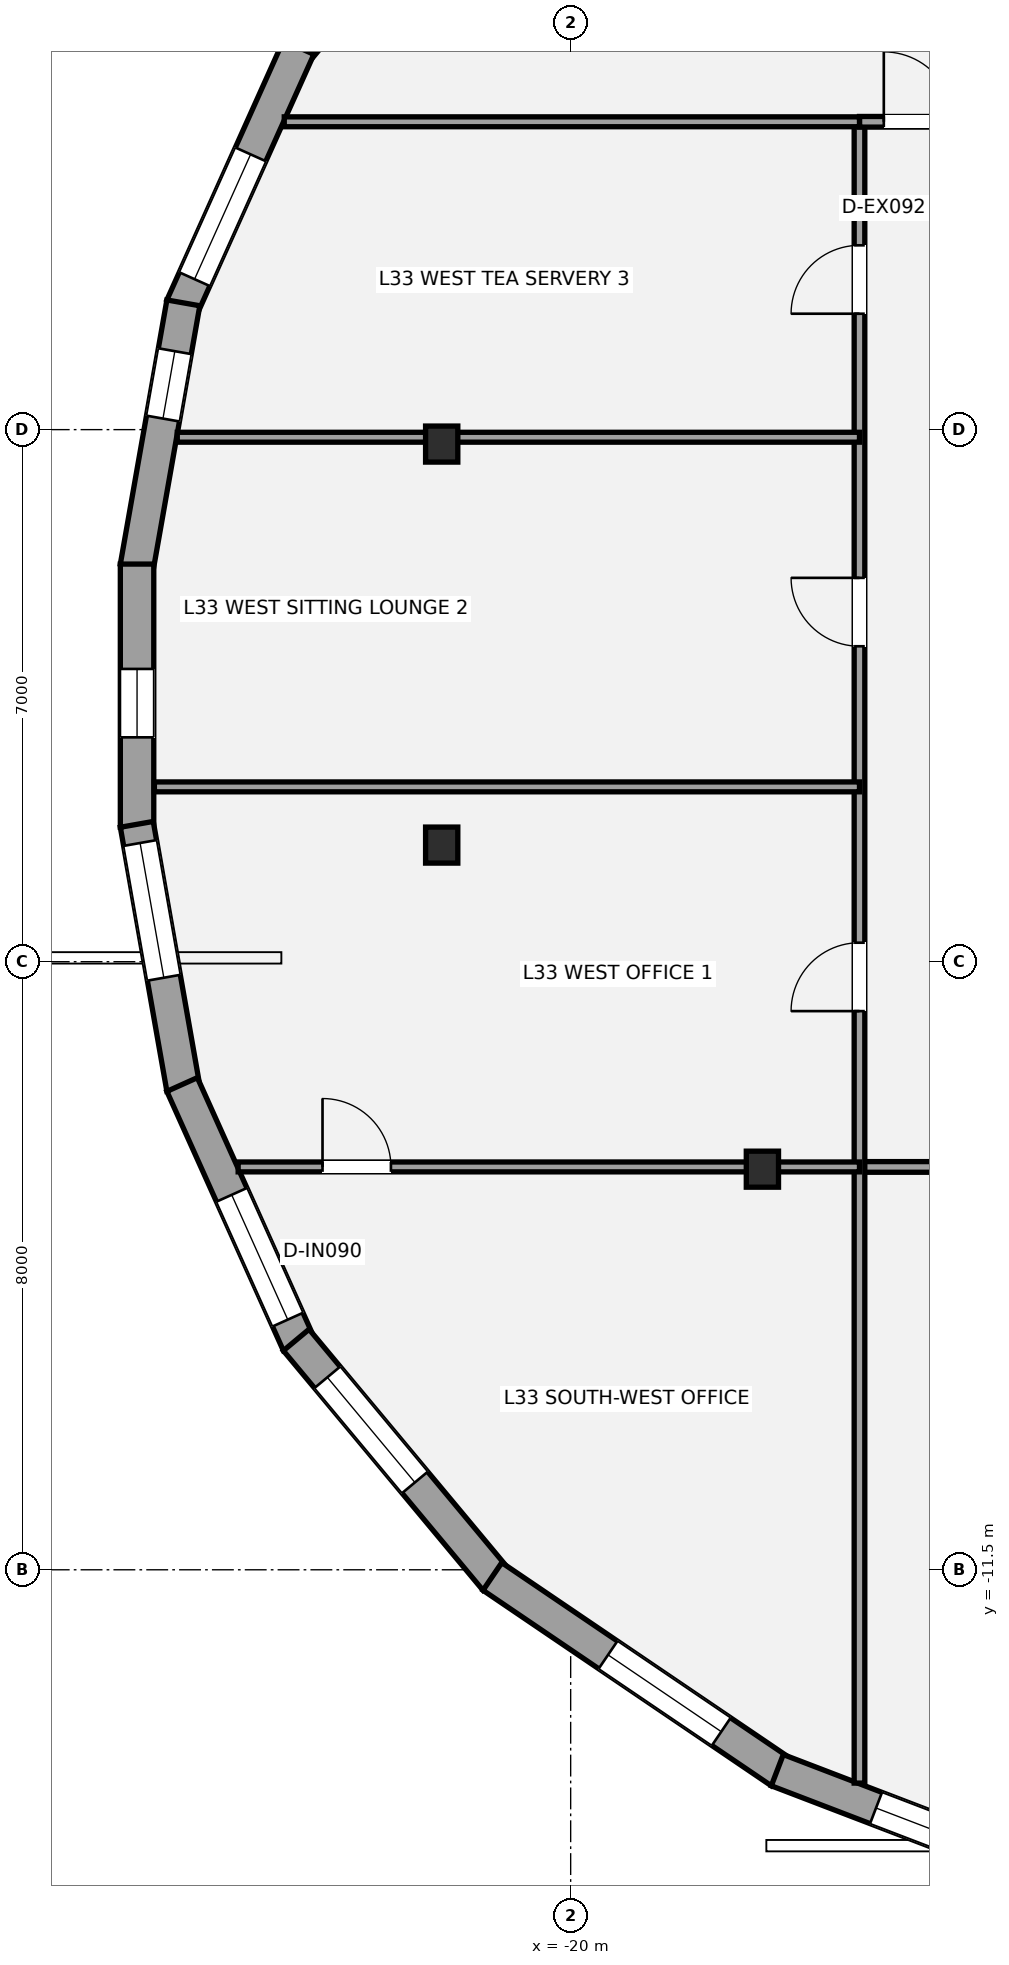
"""IFC4 building model, lengths in metres.
Left out: names, types, materials, properties, quantities, classifications, styles, units other than length and angle.
Written with IfcOpenShell. Run it as: python <this file> out.ifc"""

import sys

from ifc_helpers import new_model, si_unit, direction, frame, frame_2d, origin, origin_2d, place, context, subcontext, project, spatial, rectangle, i_section, extrude, element, fill, save


model = new_model("IFC4")
c1 = context("Model", 3, precision=1e-05, world=origin(), true_north=direction((0.0, 1.0)))
c2 = subcontext(c1, "Body", "Model", "MODEL_VIEW")
j1 = project(units=[si_unit("LENGTHUNIT", "METRE"), si_unit("PLANEANGLEUNIT", "RADIAN")], contexts=[c1])
p1 = place(None, origin())
s1 = spatial("IfcSite", under=j1, at=p1, CompositionType="ELEMENT")
p2 = place(p1, origin())
s2 = spatial("IfcBuilding", under=s1, at=p2, CompositionType="ELEMENT")
p3 = place(p2, frame((0.0, 0.0, 124.6)))
s3 = spatial("IfcBuildingStorey", under=s2, at=p3, CompositionType="ELEMENT", Elevation=124.6)
for number, where, z_axis, x_axis in (
    (1, (-21.697, 3.31, 0.0), (0.0, 0.0, 1.0), (1.0, 0.0, 0.0)),
    (2, (-21.697, -1.966, 0.0), (0.0, 0.0, 1.0), (1.0, 0.0, 0.0)),
    (3, (-17.477, -6.229, 0.0), (0.0, 0.0, 1.0), (1.0, 0.0, 0.0)),
):
    element("IfcColumn", number, at=place(p3, frame(where, z_axis=z_axis, x_axis=x_axis)), inside=s3, PredefinedType="COLUMN", context=c2, shape_type="SweptSolid", body=[
        extrude(i_section(OverallWidth=0.424, OverallDepth=0.474, WebThickness=0.048, FlangeThickness=0.077, at=origin_2d()), origin(), (0.0, 0.0, 1.0), 3.5),
    ])
p4 = place(p3, frame((-23.611, 8.477, 0.0), z_axis=(0.0, 0.0, 1.0), x_axis=(0.640084904994, 0.768304180906, 0.0)))
e4 = element("IfcWall", 4, at=p4, inside=s3, PredefinedType="STANDARD", context=c2, shape_type="SweptSolid", body=[
    extrude(rectangle(XDim=4.103, YDim=0.44, at=frame_2d((2.052, 0.0))), origin(), (0.0, 0.0, 1.0), 2.528),
])
p5 = place(p4, frame((1.664, 0.0, 0.65)))
e5 = element("IfcOpeningElement", 5, at=p5, cuts=e4, PredefinedType="OPENING", context=c2, shape_type="SweptSolid", body=[
    extrude(rectangle(XDim=1.8, YDim=1.7, at=frame_2d((0.9, 0.85))), frame((0.0, 0.23, 0.0), z_axis=(0.0, -1.0, 0.0), x_axis=(1.0, 0.0, 0.0)), (0.0, 0.0, 1.0), 0.46),
])
p6 = place(p3, frame((-25.112, 5.116, 0.0), z_axis=(0.0, 0.0, 1.0), x_axis=(0.409835385481, 0.912159501846, 0.0)))
e6 = element("IfcWall", 6, at=p6, inside=s3, PredefinedType="STANDARD", context=c2, shape_type="SweptSolid", body=[
    extrude(rectangle(XDim=3.74, YDim=0.44, at=frame_2d((1.87, 0.0))), origin(), (0.0, 0.0, 1.0), 2.528),
])
p7 = place(p6, frame((0.399, 0.0, 0.65)))
e7 = element("IfcOpeningElement", 7, at=p7, cuts=e6, PredefinedType="OPENING", context=c2, shape_type="SweptSolid", body=[
    extrude(rectangle(XDim=1.8, YDim=1.7, at=frame_2d((0.9, 0.85))), frame((0.0, 0.23, 0.0), z_axis=(0.0, -1.0, 0.0), x_axis=(1.0, 0.0, 0.0)), (0.0, 0.0, 1.0), 0.46),
])
p8 = place(p3, frame((-25.708, 1.693, 0.0), z_axis=(0.0, 0.0, 1.0), x_axis=(0.173615589384, 0.98481349865, 0.0)))
e8 = element("IfcWall", 8, at=p8, inside=s3, PredefinedType="STANDARD", context=c2, shape_type="SweptSolid", body=[
    extrude(rectangle(XDim=3.528, YDim=0.44, at=frame_2d((1.764, 0.0))), origin(), (0.0, 0.0, 1.0), 2.528),
])
p9 = place(p8, frame((1.983, 0.0, 0.58)))
e9 = element("IfcOpeningElement", 9, at=p9, cuts=e8, PredefinedType="OPENING", context=c2, shape_type="SweptSolid", body=[
    extrude(rectangle(XDim=0.9, YDim=1.35, at=frame_2d((0.45, 0.675))), frame((0.0, 0.23, 0.0), z_axis=(0.0, -1.0, 0.0), x_axis=(1.0, 0.0, 0.0)), (0.0, 0.0, 1.0), 0.46),
])
p10 = place(p3, frame((-25.705, -1.731, 0.0), z_axis=(0.0, 0.0, 1.0), x_axis=(0.0, 1.0, 0.0)))
e10 = element("IfcWall", 10, at=p10, inside=s3, PredefinedType="STANDARD", context=c2, shape_type="SweptSolid", body=[
    extrude(rectangle(XDim=3.462, YDim=0.44, at=frame_2d((1.731, 0.0))), origin(), (0.0, 0.0, 1.0), 2.528),
])
p11 = place(p10, frame((1.183, 0.0, 0.58)))
e11 = element("IfcOpeningElement", 11, at=p11, cuts=e10, PredefinedType="OPENING", context=c2, shape_type="SweptSolid", body=[
    extrude(rectangle(XDim=0.9, YDim=1.35, at=frame_2d((0.45, 0.675))), frame((0.0, 0.23, 0.0), z_axis=(0.0, -1.0, 0.0), x_axis=(1.0, 0.0, 0.0)), (0.0, 0.0, 1.0), 0.46),
])
p12 = place(p3, frame((-25.096, -5.168, 0.0), z_axis=(0.0, 0.0, 1.0), x_axis=(-0.173615589384, 0.98481349865, 0.0)))
e12 = element("IfcWall", 12, at=p12, inside=s3, PredefinedType="STANDARD", context=c2, shape_type="SweptSolid", body=[
    extrude(rectangle(XDim=3.528, YDim=0.44, at=frame_2d((1.764, 0.0))), origin(), (0.0, 0.0, 1.0), 2.528),
])
p13 = place(p12, frame((1.479, 0.0, 0.65)))
e13 = element("IfcOpeningElement", 13, at=p13, cuts=e12, PredefinedType="OPENING", context=c2, shape_type="SweptSolid", body=[
    extrude(rectangle(XDim=1.8, YDim=1.7, at=frame_2d((0.9, 0.85))), frame((0.0, 0.23, 0.0), z_axis=(0.0, -1.0, 0.0), x_axis=(1.0, 0.0, 0.0)), (0.0, 0.0, 1.0), 0.46),
])
p14 = place(p3, frame((-23.579, -8.528, 0.0), z_axis=(0.0, 0.0, 1.0), x_axis=(-0.409835385481, 0.912159501846, 0.0)))
e14 = element("IfcWall", 14, at=p14, inside=s3, PredefinedType="STANDARD", context=c2, shape_type="SweptSolid", body=[
    extrude(rectangle(XDim=3.74, YDim=0.44, at=frame_2d((1.87, 0.0))), origin(), (0.0, 0.0, 1.0), 2.528),
])
p15 = place(p14, frame((0.349, 0.0, 0.65)))
e15 = element("IfcOpeningElement", 15, at=p15, cuts=e14, PredefinedType="OPENING", context=c2, shape_type="SweptSolid", body=[
    extrude(rectangle(XDim=1.8, YDim=1.7, at=frame_2d((0.9, 0.85))), frame((0.0, 0.23, 0.0), z_axis=(0.0, -1.0, 0.0), x_axis=(1.0, 0.0, 0.0)), (0.0, 0.0, 1.0), 0.46),
])
p16 = place(p3, frame((-20.984, -11.629, 0.0), z_axis=(0.0, 0.0, 1.0), x_axis=(-0.640084904994, 0.768304180906, 0.0)))
e16 = element("IfcWall", 16, at=p16, inside=s3, PredefinedType="STANDARD", context=c2, shape_type="SweptSolid", body=[
    extrude(rectangle(XDim=4.103, YDim=0.44, at=frame_2d((2.052, 0.0))), origin(), (0.0, 0.0, 1.0), 2.528),
])
p17 = place(p16, frame((1.664, 0.0, 0.65)))
e17 = element("IfcOpeningElement", 17, at=p17, cuts=e16, PredefinedType="OPENING", context=c2, shape_type="SweptSolid", body=[
    extrude(rectangle(XDim=1.8, YDim=1.7, at=frame_2d((0.9, 0.85))), frame((0.0, 0.23, 0.0), z_axis=(0.0, -1.0, 0.0), x_axis=(1.0, 0.0, 0.0)), (0.0, 0.0, 1.0), 0.46),
])
p18 = place(p3, frame((-17.237, -14.16, 0.0), z_axis=(0.0, 0.0, 1.0), x_axis=(-0.827672849676, 0.561210881852, 0.0)))
e18 = element("IfcWall", 18, at=p18, inside=s3, PredefinedType="STANDARD", context=c2, shape_type="SweptSolid", body=[
    extrude(rectangle(XDim=4.583, YDim=0.44, at=frame_2d((2.292, 0.0))), origin(), (0.0, 0.0, 1.0), 2.528),
])
p19 = place(p18, frame((0.945, 0.0, 0.65)))
e19 = element("IfcOpeningElement", 19, at=p19, cuts=e18, PredefinedType="OPENING", context=c2, shape_type="SweptSolid", body=[
    extrude(rectangle(XDim=1.8, YDim=1.7, at=frame_2d((0.9, 0.85))), frame((0.0, 0.23, 0.0), z_axis=(0.0, -1.0, 0.0), x_axis=(1.0, 0.0, 0.0)), (0.0, 0.0, 1.0), 0.46),
])
p20 = place(p3, frame((-12.632, -15.917, 0.0), z_axis=(0.0, 0.0, 1.0), x_axis=(-0.933853964101, 0.357654545243, 0.0)))
e20 = element("IfcWall", 20, at=p20, inside=s3, PredefinedType="STANDARD", context=c2, shape_type="SweptSolid", body=[
    extrude(rectangle(XDim=4.979, YDim=0.44, at=frame_2d((2.49, 0.0))), origin(), (0.0, 0.0, 1.0), 2.528),
])
p21 = place(p20, frame((1.788, 0.0, 0.48)))
e21 = element("IfcOpeningElement", 21, at=p21, cuts=e20, PredefinedType="OPENING", context=c2, shape_type="SweptSolid", body=[
    extrude(rectangle(XDim=1.8, YDim=1.7, at=frame_2d((0.9, 0.85))), frame((0.0, 0.23, 0.0), z_axis=(0.0, -1.0, 0.0), x_axis=(1.0, 0.0, 0.0)), (0.0, 0.0, 1.0), 0.46),
])
p22 = place(p3, frame((-16.2, -6.2, 0.0), z_axis=(0.0, 0.0, 1.0), x_axis=(1.0, 0.0, 0.0)))
e22 = element("IfcWall", 22, at=p22, inside=s3, PredefinedType="PARTITIONING", context=c2, shape_type="SweptSolid", body=[
    extrude(rectangle(XDim=34.0, YDim=0.14, at=frame_2d((17.0, 0.0))), origin(), (0.0, 0.0, 1.0), 2.688),
])
p23 = place(p22, frame((2.75, 0.0, 0.0)))
e23 = element("IfcOpeningElement", 23, at=p23, cuts=e22, PredefinedType="OPENING", context=c2, shape_type="SweptSolid", body=[
    extrude(rectangle(XDim=0.9, YDim=2.1, at=frame_2d((0.45, 1.05))), frame((0.0, 0.08, 0.0), z_axis=(0.0, -1.0, 0.0), x_axis=(1.0, 0.0, 0.0)), (0.0, 0.0, 1.0), 0.16),
])
p24 = place(p22, frame((9.45, 0.0, 0.0)))
e24 = element("IfcOpeningElement", 24, at=p24, cuts=e22, PredefinedType="OPENING", context=c2, shape_type="SweptSolid", body=[
    extrude(rectangle(XDim=0.9, YDim=2.1, at=frame_2d((0.45, 1.05))), frame((0.0, 0.08, 0.0), z_axis=(0.0, -1.0, 0.0), x_axis=(1.0, 0.0, 0.0)), (0.0, 0.0, 1.0), 0.16),
])
p25 = place(p22, frame((16.45, 0.0, 0.0)))
e25 = element("IfcOpeningElement", 25, at=p25, cuts=e22, PredefinedType="OPENING", context=c2, shape_type="SweptSolid", body=[
    extrude(rectangle(XDim=0.9, YDim=2.1, at=frame_2d((0.45, 1.05))), frame((0.0, 0.08, 0.0), z_axis=(0.0, -1.0, 0.0), x_axis=(1.0, 0.0, 0.0)), (0.0, 0.0, 1.0), 0.16),
])
p26 = place(p22, frame((22.95, 0.0, 0.0)))
e26 = element("IfcOpeningElement", 26, at=p26, cuts=e22, PredefinedType="OPENING", context=c2, shape_type="SweptSolid", body=[
    extrude(rectangle(XDim=0.9, YDim=2.1, at=frame_2d((0.45, 1.05))), frame((0.0, 0.08, 0.0), z_axis=(0.0, -1.0, 0.0), x_axis=(1.0, 0.0, 0.0)), (0.0, 0.0, 1.0), 0.16),
])
p27 = place(p22, frame((29.45, 0.0, 0.0)))
e27 = element("IfcOpeningElement", 27, at=p27, cuts=e22, PredefinedType="OPENING", context=c2, shape_type="SweptSolid", body=[
    extrude(rectangle(XDim=1.5, YDim=2.15, at=frame_2d((0.75, 1.075))), frame((0.0, 0.08, 0.0), z_axis=(0.0, -1.0, 0.0), x_axis=(1.0, 0.0, 0.0)), (0.0, 0.0, 1.0), 0.16),
])
p28 = place(p3, frame((-16.2, -14.306, 0.0), z_axis=(0.0, 0.0, 1.0), x_axis=(0.0, 1.0, 0.0)))
e28 = element("IfcWall", 28, at=p28, inside=s3, PredefinedType="PARTITIONING", context=c2, shape_type="SweptSolid", body=[
    extrude(rectangle(XDim=21.856, YDim=0.14, at=frame_2d((10.928, 0.0))), origin(), (0.0, 0.0, 1.0), 2.763),
])
p29 = place(p28, frame((10.156, 0.0, 0.0)))
e29 = element("IfcOpeningElement", 29, at=p29, cuts=e28, PredefinedType="OPENING", context=c2, shape_type="SweptSolid", body=[
    extrude(rectangle(XDim=0.9, YDim=2.1, at=frame_2d((0.45, 1.05))), frame((0.0, 0.08, 0.0), z_axis=(0.0, -1.0, 0.0), x_axis=(1.0, 0.0, 0.0)), (0.0, 0.0, 1.0), 0.16),
])
p30 = place(p28, frame((14.956, 0.0, 0.0)))
e30 = element("IfcOpeningElement", 30, at=p30, cuts=e28, PredefinedType="OPENING", context=c2, shape_type="SweptSolid", body=[
    extrude(rectangle(XDim=0.9, YDim=2.1, at=frame_2d((0.45, 1.05))), frame((0.0, 0.08, 0.0), z_axis=(0.0, -1.0, 0.0), x_axis=(1.0, 0.0, 0.0)), (0.0, 0.0, 1.0), 0.16),
])
p31 = place(p28, frame((19.331, 0.0, 0.0)))
e31 = element("IfcOpeningElement", 31, at=p31, cuts=e28, PredefinedType="OPENING", context=c2, shape_type="SweptSolid", body=[
    extrude(rectangle(XDim=0.9, YDim=2.1, at=frame_2d((0.45, 1.05))), frame((0.0, 0.08, 0.0), z_axis=(0.0, -1.0, 0.0), x_axis=(1.0, 0.0, 0.0)), (0.0, 0.0, 1.0), 0.16),
])
p32 = place(p3, frame((-16.2, 7.55, 0.0), z_axis=(0.0, 0.0, 1.0), x_axis=(1.0, 0.0, 0.0)))
e32 = element("IfcWall", 32, at=p32, inside=s3, PredefinedType="PARTITIONING", context=c2, shape_type="SweptSolid", body=[
    extrude(rectangle(XDim=2.3, YDim=0.14, at=frame_2d((1.15, 0.0))), origin(), (0.0, 0.0, 1.0), 3.31),
])
p33 = place(p32, frame((0.32, 0.0, 0.0)))
e33 = element("IfcOpeningElement", 33, at=p33, cuts=e32, PredefinedType="OPENING", context=c2, shape_type="SweptSolid", body=[
    extrude(rectangle(XDim=0.92, YDim=2.15, at=frame_2d((0.46, 1.075))), frame((0.0, 0.08, 0.0), z_axis=(0.0, -1.0, 0.0), x_axis=(1.0, 0.0, 0.0)), (0.0, 0.0, 1.0), 0.16),
])
p34 = place(p3, frame((-23.768, 7.55, 0.0), z_axis=(0.0, 0.0, 1.0), x_axis=(1.0, 0.0, 0.0)))
e34 = element("IfcWall", 34, at=p34, inside=s3, PredefinedType="PARTITIONING", context=c2, shape_type="SweptSolid", body=[
    extrude(rectangle(XDim=7.568, YDim=0.13, at=frame_2d((3.784, 0.0))), origin(), (0.0, 0.0, 1.0), 3.31),
])
p35 = place(p3, frame((-24.375, -6.2, 0.0), z_axis=(0.0, 0.0, 1.0), x_axis=(1.0, 0.0, 0.0)))
e35 = element("IfcWall", 35, at=p35, inside=s3, PredefinedType="PARTITIONING", context=c2, shape_type="SweptSolid", body=[
    extrude(rectangle(XDim=8.175, YDim=0.13, at=frame_2d((4.087, 0.0))), origin(), (0.0, 0.0, 1.0), 2.688),
])
p36 = place(p35, frame((1.11, 0.0, 0.0)))
e36 = element("IfcOpeningElement", 36, at=p36, cuts=e35, PredefinedType="OPENING", context=c2, shape_type="SweptSolid", body=[
    extrude(rectangle(XDim=0.9, YDim=2.1, at=frame_2d((0.45, 1.05))), frame((0.0, 0.075, 0.0), z_axis=(0.0, -1.0, 0.0), x_axis=(1.0, 0.0, 0.0)), (0.0, 0.0, 1.0), 0.15),
])
p37 = place(p3, frame((-25.477, -1.2, 0.0), z_axis=(0.0, 0.0, 1.0), x_axis=(1.0, 0.0, 0.0)))
e37 = element("IfcWall", 37, at=p37, inside=s3, PredefinedType="PARTITIONING", context=c2, shape_type="SweptSolid", body=[
    extrude(rectangle(XDim=9.277, YDim=0.13, at=frame_2d((4.639, 0.0))), origin(), (0.0, 0.0, 1.0), 2.763),
])
p38 = place(p3, frame((-25.176, 3.4, 0.0), z_axis=(0.0, 0.0, 1.0), x_axis=(1.0, 0.0, 0.0)))
e38 = element("IfcWall", 38, at=p38, inside=s3, PredefinedType="PARTITIONING", context=c2, shape_type="SweptSolid", body=[
    extrude(rectangle(XDim=8.976, YDim=0.13, at=frame_2d((4.488, 0.0))), origin(), (0.0, 0.0, 1.0), 2.763),
])
p39 = place(p7, origin())
e39 = element("IfcWindow", 39, at=p39, inside=s3, PartitioningType="SINGLE_PANEL", PredefinedType="WINDOW", context=c2, shape_type="SweptSolid", body=[
    extrude(rectangle(XDim=1.8, YDim=1.7, at=frame_2d((0.9, 0.85))), frame((0.0, -0.01, 0.0), z_axis=(0.0, -1.0, 0.0), x_axis=(1.0, 0.0, 0.0)), (0.0, 0.0, 1.0), 0.06),
])
fill(e7, e39)
p40 = place(p9, origin())
e40 = element("IfcWindow", 40, at=p40, inside=s3, PartitioningType="SINGLE_PANEL", PredefinedType="WINDOW", context=c2, shape_type="SweptSolid", body=[
    extrude(rectangle(XDim=0.9, YDim=1.35, at=frame_2d((0.45, 0.675))), frame((0.0, -0.01, 0.0), z_axis=(0.0, -1.0, 0.0), x_axis=(1.0, 0.0, 0.0)), (0.0, 0.0, 1.0), 0.06),
])
fill(e9, e40)
p41 = place(p11, origin())
e41 = element("IfcWindow", 41, at=p41, inside=s3, PartitioningType="SINGLE_PANEL", PredefinedType="WINDOW", context=c2, shape_type="SweptSolid", body=[
    extrude(rectangle(XDim=0.9, YDim=1.35, at=frame_2d((0.45, 0.675))), frame((0.0, -0.01, 0.0), z_axis=(0.0, -1.0, 0.0), x_axis=(1.0, 0.0, 0.0)), (0.0, 0.0, 1.0), 0.06),
])
fill(e11, e41)
p42 = place(p13, origin())
e42 = element("IfcWindow", 42, at=p42, inside=s3, PartitioningType="SINGLE_PANEL", PredefinedType="WINDOW", context=c2, shape_type="SweptSolid", body=[
    extrude(rectangle(XDim=1.8, YDim=1.7, at=frame_2d((0.9, 0.85))), frame((0.0, -0.01, 0.0), z_axis=(0.0, -1.0, 0.0), x_axis=(1.0, 0.0, 0.0)), (0.0, 0.0, 1.0), 0.06),
])
fill(e13, e42)
p43 = place(p15, origin())
e43 = element("IfcWindow", 43, at=p43, inside=s3, PartitioningType="SINGLE_PANEL", PredefinedType="WINDOW", context=c2, shape_type="SweptSolid", body=[
    extrude(rectangle(XDim=1.8, YDim=1.7, at=frame_2d((0.9, 0.85))), frame((0.0, -0.01, 0.0), z_axis=(0.0, -1.0, 0.0), x_axis=(1.0, 0.0, 0.0)), (0.0, 0.0, 1.0), 0.06),
])
fill(e15, e43)
p44 = place(p17, origin())
e44 = element("IfcWindow", 44, at=p44, inside=s3, PartitioningType="SINGLE_PANEL", PredefinedType="WINDOW", context=c2, shape_type="SweptSolid", body=[
    extrude(rectangle(XDim=1.8, YDim=1.7, at=frame_2d((0.9, 0.85))), frame((0.0, -0.01, 0.0), z_axis=(0.0, -1.0, 0.0), x_axis=(1.0, 0.0, 0.0)), (0.0, 0.0, 1.0), 0.06),
])
fill(e17, e44)
p45 = place(p19, origin())
e45 = element("IfcWindow", 45, at=p45, inside=s3, PartitioningType="SINGLE_PANEL", PredefinedType="WINDOW", context=c2, shape_type="SweptSolid", body=[
    extrude(rectangle(XDim=1.8, YDim=1.7, at=frame_2d((0.9, 0.85))), frame((0.0, -0.01, 0.0), z_axis=(0.0, -1.0, 0.0), x_axis=(1.0, 0.0, 0.0)), (0.0, 0.0, 1.0), 0.06),
])
fill(e19, e45)
p46 = place(p21, origin())
e46 = element("IfcWindow", 46, at=p46, inside=s3, PartitioningType="SINGLE_PANEL", PredefinedType="WINDOW", context=c2, shape_type="SweptSolid", body=[
    extrude(rectangle(XDim=1.8, YDim=1.7, at=frame_2d((0.9, 0.85))), frame((0.0, -0.01, 0.0), z_axis=(0.0, -1.0, 0.0), x_axis=(1.0, 0.0, 0.0)), (0.0, 0.0, 1.0), 0.06),
])
fill(e21, e46)
p47 = place(p33, origin())
e47 = element("IfcDoor", 47, at=p47, inside=s3, OperationType="SINGLE_SWING_LEFT", PredefinedType="DOOR", context=c2, shape_type="SweptSolid", body=[
    extrude(rectangle(XDim=0.92, YDim=2.15, at=frame_2d((0.46, 1.075))), frame((0.0, 0.025, 0.0), z_axis=(0.0, -1.0, 0.0), x_axis=(1.0, 0.0, 0.0)), (0.0, 0.0, 1.0), 0.05),
])
fill(e33, e47)
p48 = place(p36, origin())
e48 = element("IfcDoor", 48, at=p48, inside=s3, OperationType="SINGLE_SWING_LEFT", PredefinedType="DOOR", context=c2, shape_type="SweptSolid", body=[
    extrude(rectangle(XDim=0.9, YDim=2.1, at=frame_2d((0.45, 1.05))), frame((0.0, 0.025, 0.0), z_axis=(0.0, -1.0, 0.0), x_axis=(1.0, 0.0, 0.0)), (0.0, 0.0, 1.0), 0.05),
])
fill(e36, e48)
p49 = place(p29, origin())
e49 = element("IfcDoor", 49, at=p49, inside=s3, OperationType="SINGLE_SWING_LEFT", PredefinedType="DOOR", context=c2, shape_type="SweptSolid", body=[
    extrude(rectangle(XDim=0.9, YDim=2.1, at=frame_2d((0.45, 1.05))), frame((0.0, 0.025, 0.0), z_axis=(0.0, -1.0, 0.0), x_axis=(1.0, 0.0, 0.0)), (0.0, 0.0, 1.0), 0.05),
])
fill(e29, e49)
p50 = place(p30, origin())
e50 = element("IfcDoor", 50, at=p50, inside=s3, OperationType="SINGLE_SWING_RIGHT", PredefinedType="DOOR", context=c2, shape_type="SweptSolid", body=[
    extrude(rectangle(XDim=0.9, YDim=2.1, at=frame_2d((0.45, 1.05))), frame((0.0, 0.025, 0.0), z_axis=(0.0, -1.0, 0.0), x_axis=(1.0, 0.0, 0.0)), (0.0, 0.0, 1.0), 0.05),
])
fill(e30, e50)
p51 = place(p31, origin())
e51 = element("IfcDoor", 51, at=p51, inside=s3, OperationType="SINGLE_SWING_LEFT", PredefinedType="DOOR", context=c2, shape_type="SweptSolid", body=[
    extrude(rectangle(XDim=0.9, YDim=2.1, at=frame_2d((0.45, 1.05))), frame((0.0, 0.025, 0.0), z_axis=(0.0, -1.0, 0.0), x_axis=(1.0, 0.0, 0.0)), (0.0, 0.0, 1.0), 0.05),
])
fill(e31, e51)
save(model, sys.argv[1])
